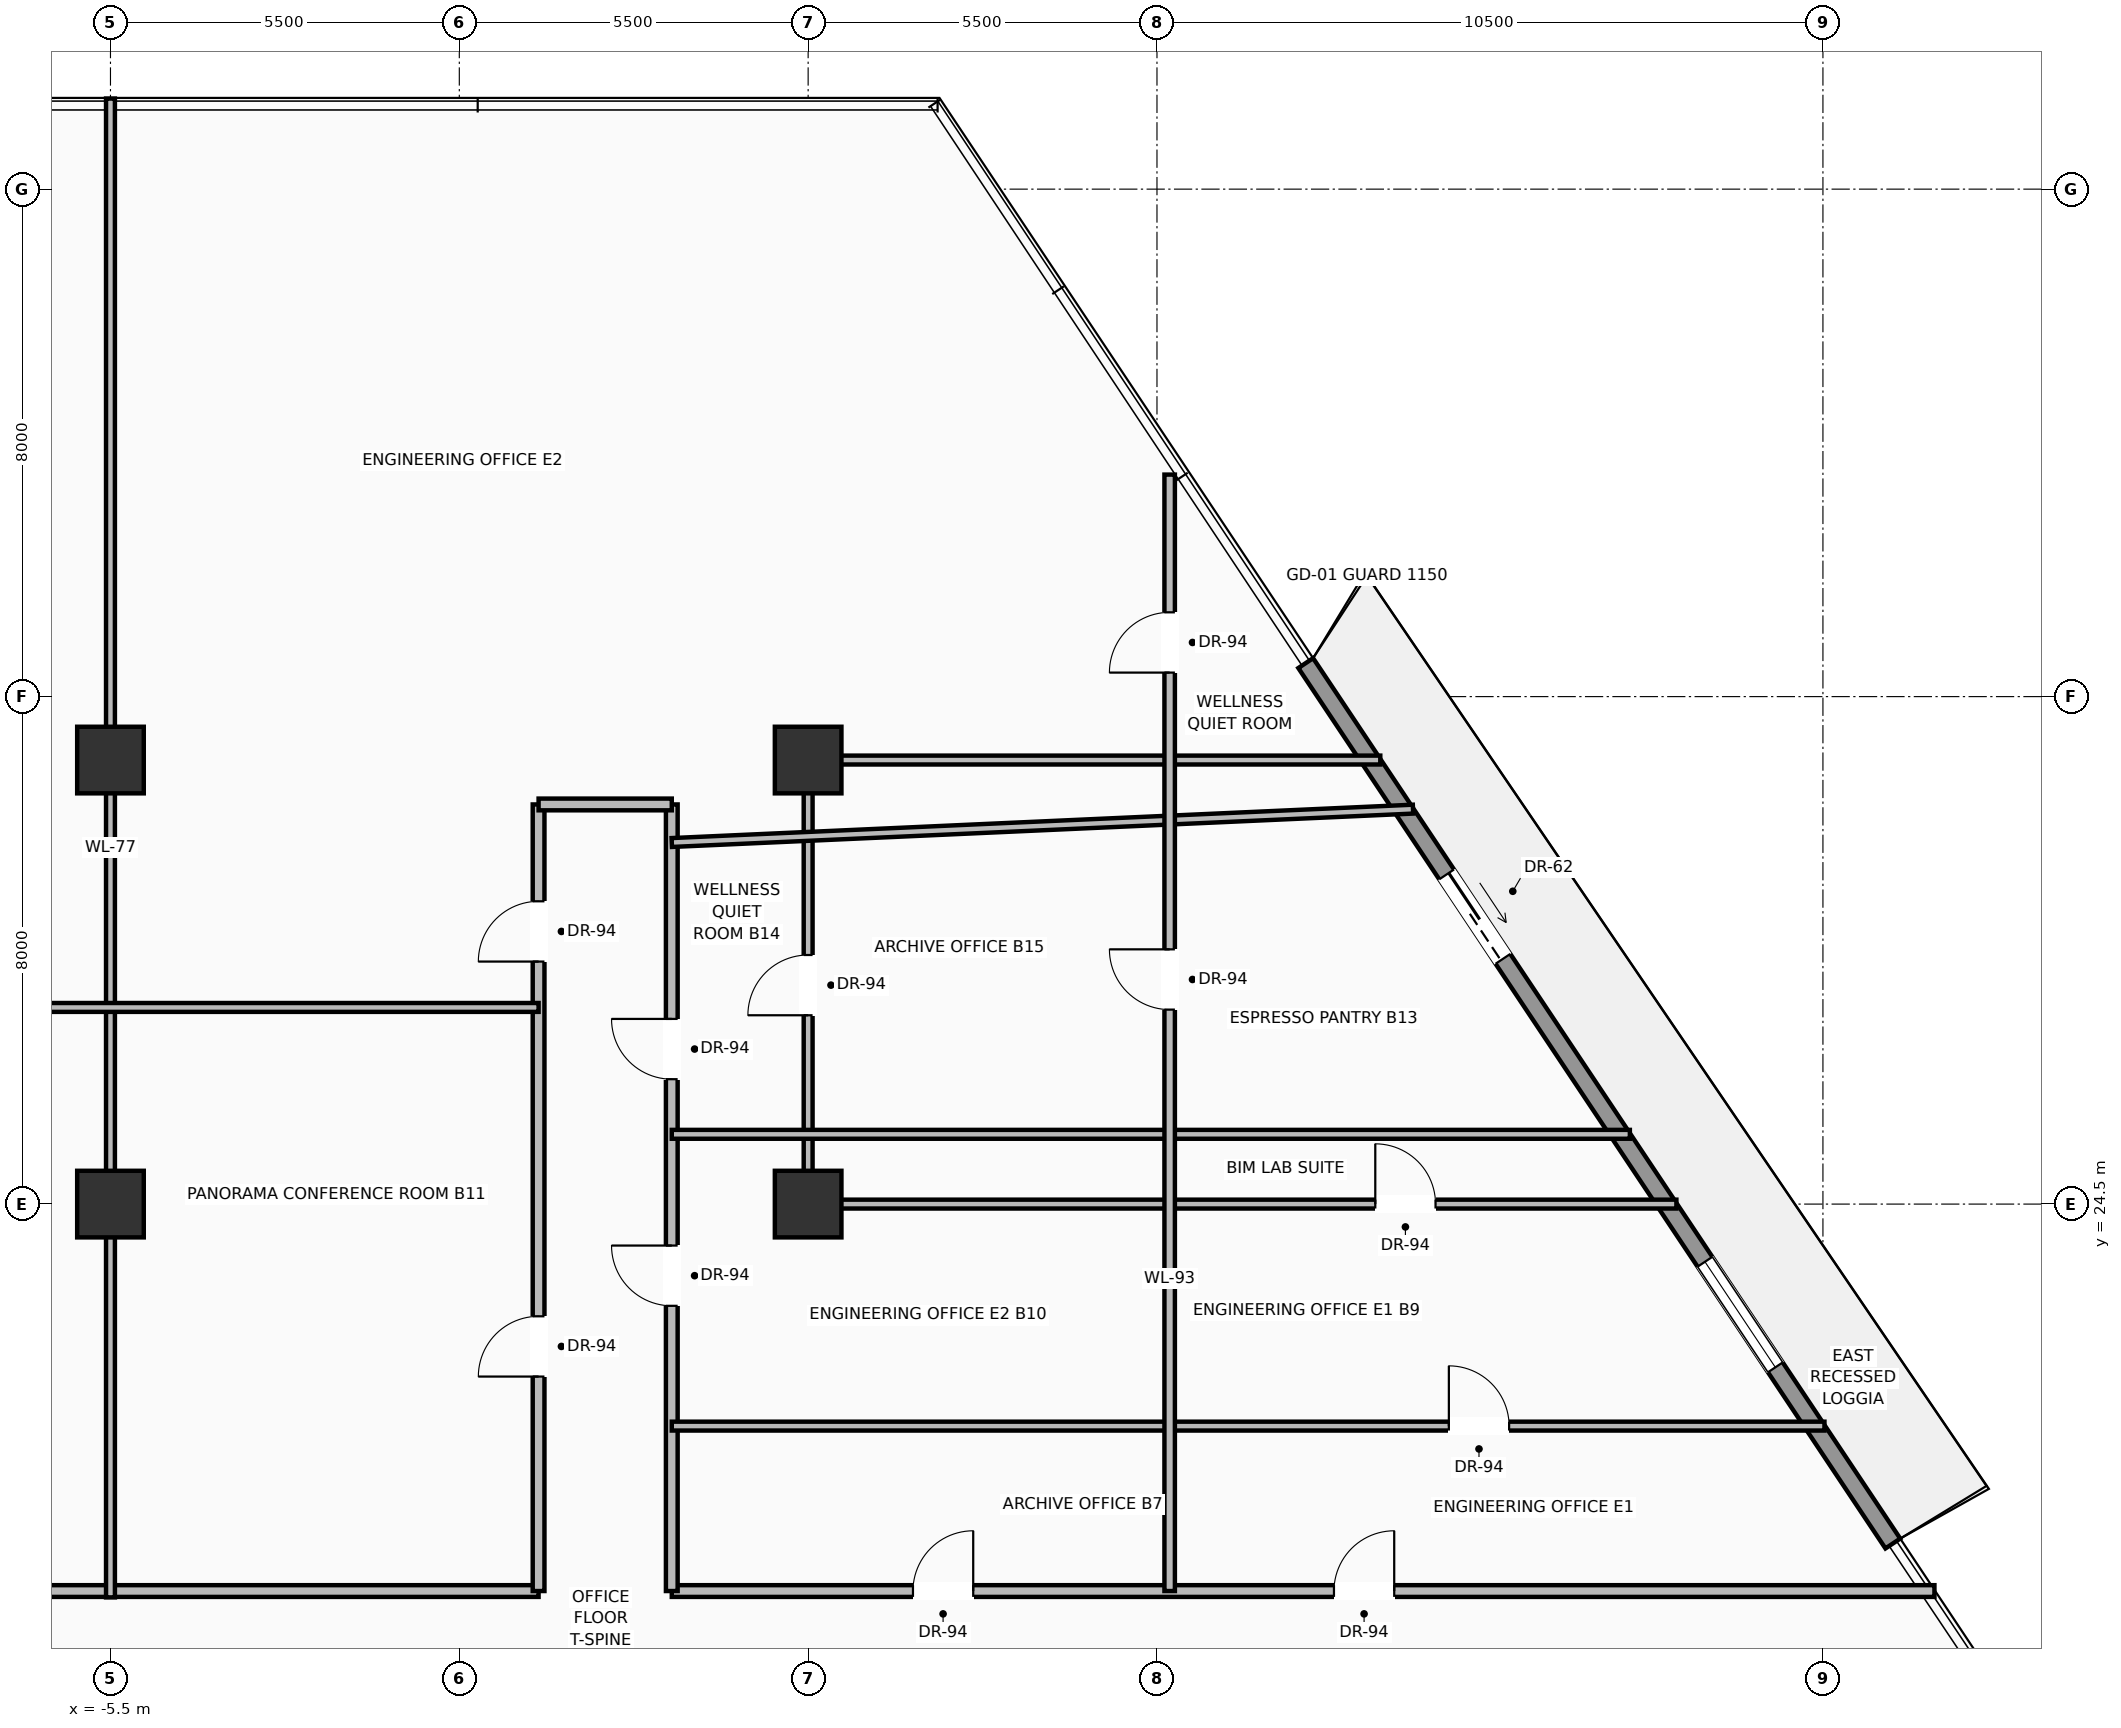
"""IFC4 building model, lengths in metres.
Left out: names, types, materials, properties, quantities, classifications, styles, units other than length and angle.
Written with IfcOpenShell. Run it as: python <this file> out.ifc"""

import sys

from ifc_helpers import new_model, si_unit, direction, frame, frame_2d, origin, origin_2d, place, context, subcontext, project, spatial, rectangle, extrude, source, transform, mapped, element, fill, save


model = new_model("IFC4")
c1 = context("Model", 3, precision=1e-05, world=origin(), true_north=direction((0.0, 1.0)))
c2 = subcontext(c1, "Body", "Model", "MODEL_VIEW")
j1 = project(units=[si_unit("LENGTHUNIT", "METRE"), si_unit("PLANEANGLEUNIT", "RADIAN")], contexts=[c1])
p1 = place(None, origin())
s1 = spatial("IfcSite", under=j1, at=p1, CompositionType="ELEMENT")
p2 = place(p1, origin())
s2 = spatial("IfcBuilding", under=s1, at=p2, CompositionType="ELEMENT")
p3 = place(p2, frame((0.0, 0.0, 53.4)))
s3 = spatial("IfcBuildingStorey", under=s2, at=p3, CompositionType="ELEMENT", Elevation=53.4)
m1 = source(origin(), c2, "Body", "SweptSolid", [
    extrude(rectangle(XDim=1.05, YDim=1.05, at=origin_2d()), origin(), (0.0, 0.0, 1.0), 3.7),
])
for number, where, z_axis, x_axis in (
    (1, (-5.5, 24.5, 0.0), (0.0, 0.0, 1.0), (1.0, 0.0, 0.0)),
    (2, (5.5, 24.5, 0.0), (0.0, 0.0, 1.0), (1.0, 0.0, 0.0)),
    (3, (-5.5, 31.5, 0.0), (0.0, 0.0, 1.0), (1.0, 0.0, 0.0)),
    (4, (5.5, 31.5, 0.0), (0.0, 0.0, 1.0), (1.0, 0.0, 0.0)),
):
    element("IfcColumn", number, at=place(p3, frame(where, z_axis=z_axis, x_axis=x_axis)), inside=s3, PredefinedType="COLUMN", context=c2, shape_type="MappedRepresentation", body=[
        mapped(m1, transform((0.0, 0.0, 0.0), scale=1.0)),
    ])
p4 = place(p3, frame((13.345, 33.028, 0.0), z_axis=(0.0, 0.0, 1.0), x_axis=(0.554869040565, -0.831937706696, 0.0)))
e5 = element("IfcWall", 5, at=p4, inside=s3, PredefinedType="SOLIDWALL", context=c2, shape_type="SweptSolid", body=[
    extrude(rectangle(XDim=16.683, YDim=0.28, at=frame_2d((8.341, 0.0))), origin(), (0.0, 0.0, 1.0), 3.03),
])
p5 = place(p4, frame((4.004, 0.0, 0.0)))
e6 = element("IfcOpeningElement", 6, at=p5, cuts=e5, PredefinedType="OPENING", context=c2, shape_type="SweptSolid", body=[
    extrude(rectangle(XDim=1.6, YDim=2.35, at=frame_2d((0.8, 1.175))), frame((0.0, 0.15, 0.0), z_axis=(0.0, -1.0, 0.0), x_axis=(1.0, 0.0, 0.0)), (0.0, 0.0, 1.0), 0.3),
])
p6 = place(p4, frame((11.344, 0.0, 0.9)))
e7 = element("IfcOpeningElement", 7, at=p6, cuts=e5, PredefinedType="OPENING", context=c2, shape_type="SweptSolid", body=[
    extrude(rectangle(XDim=2.0, YDim=1.85, at=frame_2d((1.0, 0.925))), frame((0.0, 0.15, 0.0), z_axis=(0.0, -1.0, 0.0), x_axis=(1.0, 0.0, 0.0)), (0.0, 0.0, 1.0), 0.3),
])
p7 = place(p3, frame((-23.003, 18.4, 0.0), z_axis=(0.0, 0.0, 1.0), x_axis=(1.0, 0.0, 0.0)))
e8 = element("IfcWall", 8, at=p7, inside=s3, PredefinedType="PARTITIONING", context=c2, shape_type="SweptSolid", body=[
    extrude(rectangle(XDim=24.253, YDim=0.185, at=frame_2d((12.127, 0.0))), origin(), (0.0, 0.0, 1.0), 2.747),
])
p8 = place(p7, frame((10.473, 0.0, 0.0)))
e9 = element("IfcOpeningElement", 9, at=p8, cuts=e8, PredefinedType="OPENING", context=c2, shape_type="SweptSolid", body=[
    extrude(rectangle(XDim=0.95, YDim=2.2, at=frame_2d((0.475, 1.1))), frame((0.0, 0.103, 0.0), z_axis=(0.0, -1.0, 0.0), x_axis=(1.0, 0.0, 0.0)), (0.0, 0.0, 1.0), 0.205),
])
p9 = place(p3, frame((3.35, 18.4, 0.0), z_axis=(0.0, 0.0, 1.0), x_axis=(1.0, 0.0, 0.0)))
e10 = element("IfcWall", 10, at=p9, inside=s3, PredefinedType="PARTITIONING", context=c2, shape_type="SweptSolid", body=[
    extrude(rectangle(XDim=19.908, YDim=0.185, at=frame_2d((9.954, 0.0))), origin(), (0.0, 0.0, 1.0), 2.747),
])
p10 = place(p9, frame((10.44, 0.0, 0.0)))
e11 = element("IfcOpeningElement", 11, at=p10, cuts=e10, PredefinedType="OPENING", context=c2, shape_type="SweptSolid", body=[
    extrude(rectangle(XDim=0.95, YDim=2.2, at=frame_2d((0.475, 1.1))), frame((0.0, 0.103, 0.0), z_axis=(0.0, -1.0, 0.0), x_axis=(1.0, 0.0, 0.0)), (0.0, 0.0, 1.0), 0.205),
])
p11 = place(p9, frame((3.803, 0.0, 0.0)))
e12 = element("IfcOpeningElement", 12, at=p11, cuts=e10, PredefinedType="OPENING", context=c2, shape_type="SweptSolid", body=[
    extrude(rectangle(XDim=0.95, YDim=2.2, at=frame_2d((0.475, 1.1))), frame((0.0, 0.103, 0.0), z_axis=(0.0, -1.0, 0.0), x_axis=(1.0, 0.0, 0.0)), (0.0, 0.0, 1.0), 0.205),
])
p12 = place(p3, frame((1.25, 18.4, 0.0), z_axis=(0.0, 0.0, 1.0), x_axis=(0.0, 1.0, 0.0)))
e13 = element("IfcWall", 13, at=p12, inside=s3, PredefinedType="PARTITIONING", context=c2, shape_type="SweptSolid", body=[
    extrude(rectangle(XDim=12.4, YDim=0.185, at=frame_2d((6.2, 0.0))), origin(), (0.0, 0.0, 1.0), 2.747),
])
p13 = place(p12, frame((3.381, 0.0, 0.0)))
e14 = element("IfcOpeningElement", 14, at=p13, cuts=e13, PredefinedType="OPENING", context=c2, shape_type="SweptSolid", body=[
    extrude(rectangle(XDim=0.95, YDim=2.2, at=frame_2d((0.475, 1.1))), frame((0.0, 0.103, 0.0), z_axis=(0.0, -1.0, 0.0), x_axis=(1.0, 0.0, 0.0)), (0.0, 0.0, 1.0), 0.205),
])
p14 = place(p12, frame((9.923, 0.0, 0.0)))
e15 = element("IfcOpeningElement", 15, at=p14, cuts=e13, PredefinedType="OPENING", context=c2, shape_type="SweptSolid", body=[
    extrude(rectangle(XDim=0.95, YDim=2.2, at=frame_2d((0.475, 1.1))), frame((0.0, 0.103, 0.0), z_axis=(0.0, -1.0, 0.0), x_axis=(1.0, 0.0, 0.0)), (0.0, 0.0, 1.0), 0.205),
])
p15 = place(p3, frame((3.35, 18.4, 0.0), z_axis=(0.0, 0.0, 1.0), x_axis=(0.0, 1.0, 0.0)))
e16 = element("IfcWall", 16, at=p15, inside=s3, PredefinedType="PARTITIONING", context=c2, shape_type="SweptSolid", body=[
    extrude(rectangle(XDim=12.4, YDim=0.185, at=frame_2d((6.2, 0.0))), origin(), (0.0, 0.0, 1.0), 2.747),
])
p16 = place(p15, frame((8.069, 0.0, 0.0)))
e17 = element("IfcOpeningElement", 17, at=p16, cuts=e16, PredefinedType="OPENING", context=c2, shape_type="SweptSolid", body=[
    extrude(rectangle(XDim=0.95, YDim=2.2, at=frame_2d((0.475, 1.1))), frame((0.0, 0.103, 0.0), z_axis=(0.0, -1.0, 0.0), x_axis=(1.0, 0.0, 0.0)), (0.0, 0.0, 1.0), 0.205),
])
p17 = place(p15, frame((4.496, 0.0, 0.0)))
e18 = element("IfcOpeningElement", 18, at=p17, cuts=e16, PredefinedType="OPENING", context=c2, shape_type="SweptSolid", body=[
    extrude(rectangle(XDim=0.95, YDim=2.2, at=frame_2d((0.475, 1.1))), frame((0.0, 0.103, 0.0), z_axis=(0.0, -1.0, 0.0), x_axis=(1.0, 0.0, 0.0)), (0.0, 0.0, 1.0), 0.205),
])
p18 = place(p3, frame((1.25, 30.8, 0.0), z_axis=(0.0, 0.0, 1.0), x_axis=(1.0, 0.0, 0.0)))
e19 = element("IfcWall", 19, at=p18, inside=s3, PredefinedType="PARTITIONING", context=c2, shape_type="SweptSolid", body=[
    extrude(rectangle(XDim=2.1, YDim=0.185, at=frame_2d((1.05, 0.0))), origin(), (0.0, 0.0, 1.0), 3.442),
])
p19 = place(p3, frame((-5.5, 18.3, 0.0), z_axis=(0.0, 0.0, 1.0), x_axis=(0.0, 1.0, 0.0)))
e20 = element("IfcWall", 20, at=p19, inside=s3, PredefinedType="PARTITIONING", context=c2, shape_type="SweptSolid", body=[
    extrude(rectangle(XDim=23.628, YDim=0.14, at=frame_2d((11.814, 0.0))), origin(), (0.0, 0.0, 1.0), 2.747),
])
p20 = place(p3, frame((5.5, 24.5, 0.0), z_axis=(0.0, 0.0, 1.0), x_axis=(1.0, 0.0, 0.0)))
e21 = element("IfcWall", 21, at=p20, inside=s3, PredefinedType="PARTITIONING", context=c2, shape_type="SweptSolid", body=[
    extrude(rectangle(XDim=13.69, YDim=0.14, at=frame_2d((6.845, 0.0))), origin(), (0.0, 0.0, 1.0), 2.747),
])
p21 = place(p20, frame((8.942, 0.0, 0.0)))
e22 = element("IfcOpeningElement", 22, at=p21, cuts=e21, PredefinedType="OPENING", context=c2, shape_type="SweptSolid", body=[
    extrude(rectangle(XDim=0.95, YDim=2.2, at=frame_2d((0.475, 1.1))), frame((0.0, 0.08, 0.0), z_axis=(0.0, -1.0, 0.0), x_axis=(1.0, 0.0, 0.0)), (0.0, 0.0, 1.0), 0.16),
])
p22 = place(p3, frame((5.5, 24.5, 0.0), z_axis=(0.0, 0.0, 1.0), x_axis=(0.0, 1.0, 0.0)))
e23 = element("IfcWall", 23, at=p22, inside=s3, PredefinedType="PARTITIONING", context=c2, shape_type="SweptSolid", body=[
    extrude(rectangle(XDim=7.0, YDim=0.14, at=frame_2d((3.5, 0.0))), origin(), (0.0, 0.0, 1.0), 2.747),
])
p23 = place(p22, frame((2.977, 0.0, 0.0)))
e24 = element("IfcOpeningElement", 24, at=p23, cuts=e23, PredefinedType="OPENING", context=c2, shape_type="SweptSolid", body=[
    extrude(rectangle(XDim=0.95, YDim=2.2, at=frame_2d((0.475, 1.1))), frame((0.0, 0.08, 0.0), z_axis=(0.0, -1.0, 0.0), x_axis=(1.0, 0.0, 0.0)), (0.0, 0.0, 1.0), 0.16),
])
p24 = place(p3, frame((5.5, 31.5, 0.0), z_axis=(0.0, 0.0, 1.0), x_axis=(1.0, 0.0, 0.0)))
e25 = element("IfcWall", 25, at=p24, inside=s3, PredefinedType="PARTITIONING", context=c2, shape_type="SweptSolid", body=[
    extrude(rectangle(XDim=9.021, YDim=0.14, at=frame_2d((4.51, 0.0))), origin(), (0.0, 0.0, 1.0), 2.747),
])
p25 = place(p3, frame((-16.74, 27.6, 0.0), z_axis=(0.0, 0.0, 1.0), x_axis=(1.0, 0.0, 0.0)))
e26 = element("IfcWall", 26, at=p25, inside=s3, PredefinedType="PARTITIONING", context=c2, shape_type="SweptSolid", body=[
    extrude(rectangle(XDim=17.99, YDim=0.14, at=frame_2d((8.995, 0.0))), origin(), (0.0, 0.0, 1.0), 2.747),
])
p26 = place(p25, frame((5.418, 0.0, 0.0)))
e27 = element("IfcOpeningElement", 27, at=p26, cuts=e26, PredefinedType="OPENING", context=c2, shape_type="SweptSolid", body=[
    extrude(rectangle(XDim=0.95, YDim=2.2, at=frame_2d((0.475, 1.1))), frame((0.0, 0.08, 0.0), z_axis=(0.0, -1.0, 0.0), x_axis=(1.0, 0.0, 0.0)), (0.0, 0.0, 1.0), 0.16),
])
p27 = place(p3, frame((3.35, 21.0, 0.0), z_axis=(0.0, 0.0, 1.0), x_axis=(1.0, 0.0, 0.0)))
e28 = element("IfcWall", 28, at=p27, inside=s3, PredefinedType="PARTITIONING", context=c2, shape_type="SweptSolid", body=[
    extrude(rectangle(XDim=18.174, YDim=0.14, at=frame_2d((9.087, 0.0))), origin(), (0.0, 0.0, 1.0), 2.747),
])
p28 = place(p27, frame((12.252, 0.0, 0.0)))
e29 = element("IfcOpeningElement", 29, at=p28, cuts=e28, PredefinedType="OPENING", context=c2, shape_type="SweptSolid", body=[
    extrude(rectangle(XDim=0.95, YDim=2.2, at=frame_2d((0.475, 1.1))), frame((0.0, 0.08, 0.0), z_axis=(0.0, -1.0, 0.0), x_axis=(1.0, 0.0, 0.0)), (0.0, 0.0, 1.0), 0.16),
])
p29 = place(p3, frame((3.35, 25.6, 0.0), z_axis=(0.0, 0.0, 1.0), x_axis=(1.0, 0.0, 0.0)))
e30 = element("IfcWall", 30, at=p29, inside=s3, PredefinedType="PARTITIONING", context=c2, shape_type="SweptSolid", body=[
    extrude(rectangle(XDim=15.106, YDim=0.14, at=frame_2d((7.553, 0.0))), origin(), (0.0, 0.0, 1.0), 2.747),
])
p30 = place(p3, frame((3.35, 30.2, 0.0), z_axis=(0.0, 0.0, 1.0), x_axis=(0.99898823837, 0.044972209185, 0.0)))
e31 = element("IfcWall", 31, at=p30, inside=s3, PredefinedType="PARTITIONING", context=c2, shape_type="SweptSolid", body=[
    extrude(rectangle(XDim=11.699, YDim=0.14, at=frame_2d((5.849, 0.0))), origin(), (0.0, 0.0, 1.0), 2.747),
])
p31 = place(p3, frame((11.2, 18.4, 0.0), z_axis=(0.0, 0.0, 1.0), x_axis=(0.0, 1.0, 0.0)))
e32 = element("IfcWall", 32, at=p31, inside=s3, PredefinedType="PARTITIONING", context=c2, shape_type="SweptSolid", body=[
    extrude(rectangle(XDim=17.6, YDim=0.165, at=frame_2d((8.8, 0.0))), origin(), (0.0, 0.0, 1.0), 2.747),
])
p32 = place(p31, frame((9.166, 0.0, 0.0)))
e33 = element("IfcOpeningElement", 33, at=p32, cuts=e32, PredefinedType="OPENING", context=c2, shape_type="SweptSolid", body=[
    extrude(rectangle(XDim=0.95, YDim=2.2, at=frame_2d((0.475, 1.1))), frame((0.0, 0.093, 0.0), z_axis=(0.0, -1.0, 0.0), x_axis=(1.0, 0.0, 0.0)), (0.0, 0.0, 1.0), 0.185),
])
p33 = place(p31, frame((14.479, 0.0, 0.0)))
e34 = element("IfcOpeningElement", 34, at=p33, cuts=e32, PredefinedType="OPENING", context=c2, shape_type="SweptSolid", body=[
    extrude(rectangle(XDim=0.95, YDim=2.2, at=frame_2d((0.475, 1.1))), frame((0.0, 0.093, 0.0), z_axis=(0.0, -1.0, 0.0), x_axis=(1.0, 0.0, 0.0)), (0.0, 0.0, 1.0), 0.185),
])
m2 = source(origin(), c2, "Body", "SweptSolid", [
    extrude(rectangle(XDim=1.6, YDim=2.35, at=frame_2d((0.8, 1.175))), frame((0.0, 0.025, 0.0), z_axis=(0.0, -1.0, 0.0), x_axis=(1.0, 0.0, 0.0)), (0.0, 0.0, 1.0), 0.05),
])
p34 = place(p5, origin())
e35 = element("IfcDoor", 35, at=p34, inside=s3, OperationType="SLIDING_TO_RIGHT", PredefinedType="DOOR", context=c2, shape_type="MappedRepresentation", body=[
    mapped(m2, transform((0.0, 0.0, 0.0), scale=1.0)),
])
fill(e6, e35)
m3 = source(origin(), c2, "Body", "SweptSolid", [
    extrude(rectangle(XDim=2.0, YDim=1.85, at=frame_2d((1.0, 0.925))), frame((0.0, 0.03, 0.0), z_axis=(0.0, -1.0, 0.0), x_axis=(1.0, 0.0, 0.0)), (0.0, 0.0, 1.0), 0.06),
])
p35 = place(p6, origin())
e36 = element("IfcWindow", 36, at=p35, inside=s3, PartitioningType="SINGLE_PANEL", PredefinedType="WINDOW", context=c2, shape_type="MappedRepresentation", body=[
    mapped(m3, transform((0.0, 0.0, 0.0), scale=1.0)),
])
fill(e7, e36)
m4 = source(origin(), c2, "Body", "SweptSolid", [
    extrude(rectangle(XDim=0.95, YDim=2.2, at=frame_2d((0.475, 1.1))), frame((0.0, 0.025, 0.0), z_axis=(0.0, -1.0, 0.0), x_axis=(1.0, 0.0, 0.0)), (0.0, 0.0, 1.0), 0.05),
])
p36 = place(p10, origin())
e37 = element("IfcDoor", 37, at=p36, inside=s3, OperationType="SINGLE_SWING_RIGHT", PredefinedType="DOOR", context=c2, shape_type="MappedRepresentation", body=[
    mapped(m4, transform((0.0, 0.0, 0.0), scale=1.0)),
])
fill(e11, e37)
p37 = place(p13, origin())
e38 = element("IfcDoor", 38, at=p37, inside=s3, OperationType="SINGLE_SWING_LEFT", PredefinedType="DOOR", context=c2, shape_type="MappedRepresentation", body=[
    mapped(m4, transform((0.0, 0.0, 0.0), scale=1.0)),
])
fill(e14, e38)
p38 = place(p16, origin())
e39 = element("IfcDoor", 39, at=p38, inside=s3, OperationType="SINGLE_SWING_RIGHT", PredefinedType="DOOR", context=c2, shape_type="MappedRepresentation", body=[
    mapped(m4, transform((0.0, 0.0, 0.0), scale=1.0)),
])
fill(e17, e39)
p39 = place(p11, origin())
e40 = element("IfcDoor", 40, at=p39, inside=s3, OperationType="SINGLE_SWING_RIGHT", PredefinedType="DOOR", context=c2, shape_type="MappedRepresentation", body=[
    mapped(m4, transform((0.0, 0.0, 0.0), scale=1.0)),
])
fill(e12, e40)
p40 = place(p28, origin())
e41 = element("IfcDoor", 41, at=p40, inside=s3, OperationType="SINGLE_SWING_LEFT", PredefinedType="DOOR", context=c2, shape_type="MappedRepresentation", body=[
    mapped(m4, transform((0.0, 0.0, 0.0), scale=1.0)),
])
fill(e29, e41)
p41 = place(p17, origin())
e42 = element("IfcDoor", 42, at=p41, inside=s3, OperationType="SINGLE_SWING_RIGHT", PredefinedType="DOOR", context=c2, shape_type="MappedRepresentation", body=[
    mapped(m4, transform((0.0, 0.0, 0.0), scale=1.0)),
])
fill(e18, e42)
p42 = place(p23, origin())
e43 = element("IfcDoor", 43, at=p42, inside=s3, OperationType="SINGLE_SWING_LEFT", PredefinedType="DOOR", context=c2, shape_type="MappedRepresentation", body=[
    mapped(m4, transform((0.0, 0.0, 0.0), scale=1.0)),
])
fill(e24, e43)
p43 = place(p14, origin())
e44 = element("IfcDoor", 44, at=p43, inside=s3, OperationType="SINGLE_SWING_LEFT", PredefinedType="DOOR", context=c2, shape_type="MappedRepresentation", body=[
    mapped(m4, transform((0.0, 0.0, 0.0), scale=1.0)),
])
fill(e15, e44)
p44 = place(p21, origin())
e45 = element("IfcDoor", 45, at=p44, inside=s3, OperationType="SINGLE_SWING_LEFT", PredefinedType="DOOR", context=c2, shape_type="MappedRepresentation", body=[
    mapped(m4, transform((0.0, 0.0, 0.0), scale=1.0)),
])
fill(e22, e45)
p45 = place(p32, origin())
e46 = element("IfcDoor", 46, at=p45, inside=s3, OperationType="SINGLE_SWING_RIGHT", PredefinedType="DOOR", context=c2, shape_type="MappedRepresentation", body=[
    mapped(m4, transform((0.0, 0.0, 0.0), scale=1.0)),
])
fill(e33, e46)
p46 = place(p33, origin())
e47 = element("IfcDoor", 47, at=p46, inside=s3, OperationType="SINGLE_SWING_LEFT", PredefinedType="DOOR", context=c2, shape_type="MappedRepresentation", body=[
    mapped(m4, transform((0.0, 0.0, 0.0), scale=1.0)),
])
fill(e34, e47)
save(model, sys.argv[1])
